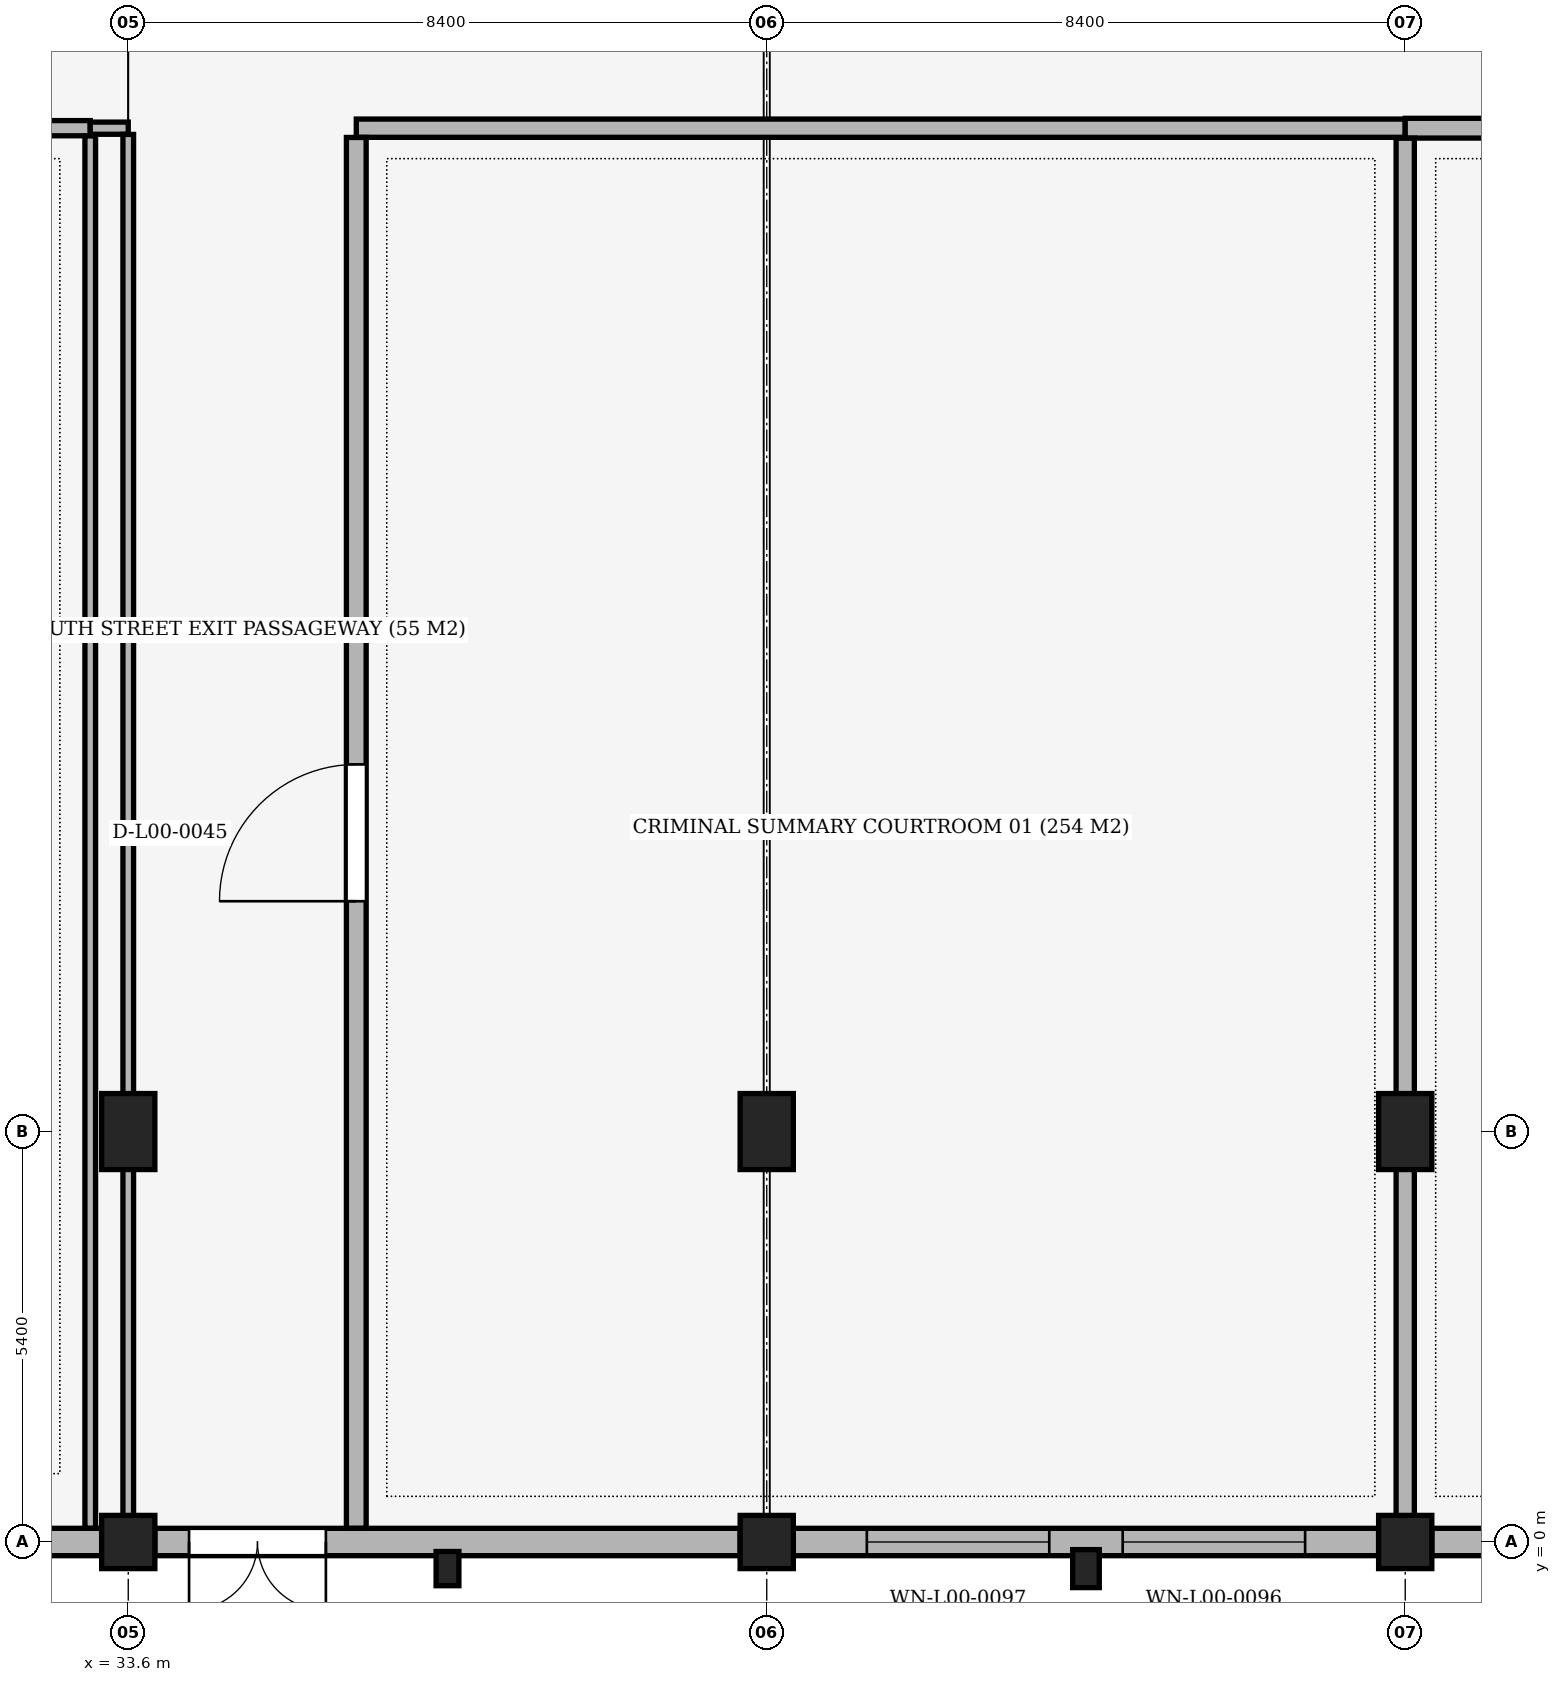
"""IFC4 building model, lengths in metres.
Left out: names, types, materials, properties, quantities, classifications, styles, units other than length and angle.
Written with IfcOpenShell. Run it as: python <this file> out.ifc"""

import sys

from ifc_helpers import new_model, si_unit, direction, frame, frame_2d, origin, origin_2d, place, context, subcontext, project, spatial, rectangle, extrude, element, fill, save


model = new_model("IFC4")
c1 = context("Model", 3, precision=1e-05, world=origin(), true_north=direction((0.0, 1.0)))
c2 = subcontext(c1, "Body", "Model", "MODEL_VIEW")
j1 = project(units=[si_unit("LENGTHUNIT", "METRE"), si_unit("PLANEANGLEUNIT", "RADIAN")], contexts=[c1])
p1 = place(None, origin())
s1 = spatial("IfcSite", under=j1, at=p1, CompositionType="ELEMENT")
p2 = place(p1, origin())
s2 = spatial("IfcBuilding", under=s1, at=p2, CompositionType="ELEMENT")
p3 = place(p2, origin())
s3 = spatial("IfcBuildingStorey", under=s2, at=p3, CompositionType="ELEMENT", Elevation=0.0)
p4 = place(p3, frame((33.6, 0.0, 0.0), z_axis=(0.0, 0.0, 1.0), x_axis=(1.0, 0.0, 0.0)))
e1 = element("IfcColumn", 1, at=p4, inside=s3, PredefinedType="COLUMN", context=c2, shape_type="SweptSolid", body=[
    extrude(rectangle(XDim=0.7, YDim=0.7, at=origin_2d()), origin(), (0.0, 0.0, 1.0), 5.1),
])
p5 = place(p3, frame((33.6, 5.4, 0.0), z_axis=(0.0, 0.0, 1.0), x_axis=(1.0, 0.0, 0.0)))
e2 = element("IfcColumn", 2, at=p5, inside=s3, PredefinedType="COLUMN", context=c2, shape_type="SweptSolid", body=[
    extrude(rectangle(XDim=0.7, YDim=1.0, at=origin_2d()), origin(), (0.0, 0.0, 1.0), 5.1),
])
p6 = place(p3, frame((42.0, 0.0, 0.0), z_axis=(0.0, 0.0, 1.0), x_axis=(1.0, 0.0, 0.0)))
e3 = element("IfcColumn", 3, at=p6, inside=s3, PredefinedType="COLUMN", context=c2, shape_type="SweptSolid", body=[
    extrude(rectangle(XDim=0.7, YDim=0.7, at=origin_2d()), origin(), (0.0, 0.0, 1.0), 5.1),
])
p7 = place(p3, frame((42.0, 5.4, 0.0), z_axis=(0.0, 0.0, 1.0), x_axis=(1.0, 0.0, 0.0)))
e4 = element("IfcColumn", 4, at=p7, inside=s3, PredefinedType="COLUMN", context=c2, shape_type="SweptSolid", body=[
    extrude(rectangle(XDim=0.7, YDim=1.0, at=origin_2d()), origin(), (0.0, 0.0, 1.0), 5.1),
])
p8 = place(p3, frame((50.4, 0.0, 0.0), z_axis=(0.0, 0.0, 1.0), x_axis=(1.0, 0.0, 0.0)))
e5 = element("IfcColumn", 5, at=p8, inside=s3, PredefinedType="COLUMN", context=c2, shape_type="SweptSolid", body=[
    extrude(rectangle(XDim=0.7, YDim=0.7, at=origin_2d()), origin(), (0.0, 0.0, 1.0), 5.1),
])
p9 = place(p3, frame((50.4, 5.4, 0.0), z_axis=(0.0, 0.0, 1.0), x_axis=(1.0, 0.0, 0.0)))
e6 = element("IfcColumn", 6, at=p9, inside=s3, PredefinedType="COLUMN", context=c2, shape_type="SweptSolid", body=[
    extrude(rectangle(XDim=0.7, YDim=1.0, at=origin_2d()), origin(), (0.0, 0.0, 1.0), 5.1),
])
p10 = place(p3, frame((37.8, -0.35, 0.0), z_axis=(0.0, 0.0, 1.0), x_axis=(1.0, 0.0, 0.0)))
e7 = element("IfcColumn", 7, at=p10, inside=s3, PredefinedType="PILASTER", context=c2, shape_type="SweptSolid", body=[
    extrude(rectangle(XDim=0.3, YDim=0.45, at=origin_2d()), origin(), (0.0, 0.0, 1.0), 5.1),
])
p11 = place(p3, frame((46.2, -0.35, 0.0), z_axis=(0.0, 0.0, 1.0), x_axis=(1.0, 0.0, 0.0)))
e8 = element("IfcColumn", 8, at=p11, inside=s3, PredefinedType="PILASTER", context=c2, shape_type="SweptSolid", body=[
    extrude(rectangle(XDim=0.35, YDim=0.5, at=origin_2d()), origin(), (0.0, 0.0, 1.0), 5.1),
])
p12 = place(p3, frame((58.45, 0.0, 0.0), z_axis=(0.0, 0.0, 1.0), x_axis=(-1.0, 0.0, 0.0)))
e9 = element("IfcWall", 9, at=p12, inside=s3, PredefinedType="SOLIDWALL", context=c2, shape_type="SweptSolid", body=[
    extrude(rectangle(XDim=7.7, YDim=0.36, at=frame_2d((3.85, 0.0))), origin(), (0.0, 0.0, 1.0), 4.07),
])
p13 = place(p12, frame((0.967, 0.0, 0.85)))
e10 = element("IfcOpeningElement", 10, at=p13, cuts=e9, PredefinedType="OPENING", context=c2, shape_type="SweptSolid", body=[
    extrude(rectangle(XDim=2.4, YDim=2.4, at=frame_2d((1.2, 1.2))), frame((0.0, 0.195, 0.0), z_axis=(0.0, -1.0, 0.0), x_axis=(1.0, 0.0, 0.0)), (0.0, 0.0, 1.0), 0.39),
])
p14 = place(p12, frame((4.333, 0.0, 0.85)))
e11 = element("IfcOpeningElement", 11, at=p14, cuts=e9, PredefinedType="OPENING", context=c2, shape_type="SweptSolid", body=[
    extrude(rectangle(XDim=2.4, YDim=2.4, at=frame_2d((1.2, 1.2))), frame((0.0, 0.195, 0.0), z_axis=(0.0, -1.0, 0.0), x_axis=(1.0, 0.0, 0.0)), (0.0, 0.0, 1.0), 0.39),
])
p15 = place(p3, frame((50.05, 0.0, 0.0), z_axis=(0.0, 0.0, 1.0), x_axis=(-1.0, 0.0, 0.0)))
e12 = element("IfcWall", 12, at=p15, inside=s3, PredefinedType="SOLIDWALL", context=c2, shape_type="SweptSolid", body=[
    extrude(rectangle(XDim=7.7, YDim=0.36, at=frame_2d((3.85, 0.0))), origin(), (0.0, 0.0, 1.0), 4.07),
])
p16 = place(p15, frame((0.967, 0.0, 0.85)))
e13 = element("IfcOpeningElement", 13, at=p16, cuts=e12, PredefinedType="OPENING", context=c2, shape_type="SweptSolid", body=[
    extrude(rectangle(XDim=2.4, YDim=2.4, at=frame_2d((1.2, 1.2))), frame((0.0, 0.195, 0.0), z_axis=(0.0, -1.0, 0.0), x_axis=(1.0, 0.0, 0.0)), (0.0, 0.0, 1.0), 0.39),
])
p17 = place(p15, frame((4.333, 0.0, 0.85)))
e14 = element("IfcOpeningElement", 14, at=p17, cuts=e12, PredefinedType="OPENING", context=c2, shape_type="SweptSolid", body=[
    extrude(rectangle(XDim=2.4, YDim=2.4, at=frame_2d((1.2, 1.2))), frame((0.0, 0.195, 0.0), z_axis=(0.0, -1.0, 0.0), x_axis=(1.0, 0.0, 0.0)), (0.0, 0.0, 1.0), 0.39),
])
p18 = place(p3, frame((41.65, 0.0, 0.0), z_axis=(0.0, 0.0, 1.0), x_axis=(-1.0, 0.0, 0.0)))
e15 = element("IfcWall", 15, at=p18, inside=s3, PredefinedType="SOLIDWALL", context=c2, shape_type="SweptSolid", body=[
    extrude(rectangle(XDim=7.7, YDim=0.36, at=frame_2d((3.85, 0.0))), origin(), (0.0, 0.0, 1.0), 4.07),
])
p19 = place(p18, frame((5.45, 0.0, 0.0)))
e16 = element("IfcOpeningElement", 16, at=p19, cuts=e15, PredefinedType="OPENING", context=c2, shape_type="SweptSolid", body=[
    extrude(rectangle(XDim=1.8, YDim=2.2, at=frame_2d((0.9, 1.1))), frame((0.0, 0.195, 0.0), z_axis=(0.0, -1.0, 0.0), x_axis=(1.0, 0.0, 0.0)), (0.0, 0.0, 1.0), 0.39),
])
p20 = place(p3, frame((33.25, 0.0, 0.0), z_axis=(0.0, 0.0, 1.0), x_axis=(-1.0, 0.0, 0.0)))
e17 = element("IfcWall", 17, at=p20, inside=s3, PredefinedType="SOLIDWALL", context=c2, shape_type="SweptSolid", body=[
    extrude(rectangle(XDim=7.7, YDim=0.36, at=frame_2d((3.85, 0.0))), origin(), (0.0, 0.0, 1.0), 4.07),
])
p21 = place(p20, frame((1.367, 0.0, 0.85)))
e18 = element("IfcOpeningElement", 18, at=p21, cuts=e17, PredefinedType="OPENING", context=c2, shape_type="SweptSolid", body=[
    extrude(rectangle(XDim=1.8, YDim=2.4, at=frame_2d((0.9, 1.2))), frame((0.0, 0.195, 0.0), z_axis=(0.0, -1.0, 0.0), x_axis=(1.0, 0.0, 0.0)), (0.0, 0.0, 1.0), 0.39),
])
p22 = place(p20, frame((4.533, 0.0, 0.85)))
e19 = element("IfcOpeningElement", 19, at=p22, cuts=e17, PredefinedType="OPENING", context=c2, shape_type="SweptSolid", body=[
    extrude(rectangle(XDim=1.8, YDim=2.4, at=frame_2d((0.9, 1.2))), frame((0.0, 0.195, 0.0), z_axis=(0.0, -1.0, 0.0), x_axis=(1.0, 0.0, 0.0)), (0.0, 0.0, 1.0), 0.39),
])
p23 = place(p3, frame((16.8, 18.6, 0.0), z_axis=(0.0, 0.0, 1.0), x_axis=(1.0, 0.0, 0.0)))
e20 = element("IfcWall", 20, at=p23, inside=s3, PredefinedType="PARTITIONING", context=c2, shape_type="SweptSolid", body=[
    extrude(rectangle(XDim=16.3, YDim=0.2, at=frame_2d((8.15, 0.0))), origin(), (0.0, 0.0, 1.0), 3.67),
])
p24 = place(p23, frame((7.35, 0.0, 0.0)))
e21 = element("IfcOpeningElement", 21, at=p24, cuts=e20, PredefinedType="OPENING", context=c2, shape_type="SweptSolid", body=[
    extrude(rectangle(XDim=1.6, YDim=2.3, at=frame_2d((0.8, 1.15))), frame((0.0, 0.115, 0.0), z_axis=(0.0, -1.0, 0.0), x_axis=(1.0, 0.0, 0.0)), (0.0, 0.0, 1.0), 0.23),
])
p25 = place(p3, frame((33.1, 18.6, 0.0), z_axis=(0.0, 0.0, 1.0), x_axis=(1.0, 0.0, 0.0)))
e22 = element("IfcWall", 22, at=p25, inside=s3, PredefinedType="PARTITIONING", context=c2, shape_type="SweptSolid", body=[
    extrude(rectangle(XDim=0.5, YDim=0.16, at=frame_2d((0.25, 0.0))), origin(), (0.0, 0.0, 1.0), 3.67),
])
p26 = place(p3, frame((36.6, 18.6, 0.0), z_axis=(0.0, 0.0, 1.0), x_axis=(1.0, 0.0, 0.0)))
e23 = element("IfcWall", 23, at=p26, inside=s3, PredefinedType="PARTITIONING", context=c2, shape_type="SweptSolid", body=[
    extrude(rectangle(XDim=13.8, YDim=0.24, at=frame_2d((6.9, 0.0))), origin(), (0.0, 0.0, 1.0), 3.67),
])
p27 = place(p3, frame((50.4, 18.6, 0.0), z_axis=(0.0, 0.0, 1.0), x_axis=(1.0, 0.0, 0.0)))
e24 = element("IfcWall", 24, at=p27, inside=s3, PredefinedType="PARTITIONING", context=c2, shape_type="SweptSolid", body=[
    extrude(rectangle(XDim=16.8, YDim=0.26, at=frame_2d((8.4, 0.0))), origin(), (0.0, 0.0, 1.0), 3.67),
])
p28 = place(p3, frame((33.1, 0.182, 0.0), z_axis=(0.0, 0.0, 1.0), x_axis=(0.0, 1.0, 0.0)))
e25 = element("IfcWall", 25, at=p28, inside=s3, PredefinedType="PARTITIONING", context=c2, shape_type="SweptSolid", body=[
    extrude(rectangle(XDim=18.316, YDim=0.14, at=frame_2d((9.158, 0.0))), origin(), (0.0, 0.0, 1.0), 4.07),
])
p29 = place(p3, frame((33.6, -0.028, 0.0), z_axis=(0.0, 0.0, 1.0), x_axis=(0.0, 1.0, 0.0)))
e26 = element("IfcWall", 26, at=p29, inside=s3, PredefinedType="PARTITIONING", context=c2, shape_type="SweptSolid", body=[
    extrude(rectangle(XDim=18.546, YDim=0.14, at=frame_2d((9.273, 0.0))), origin(), (0.0, 0.0, 1.0), 3.67),
])
p30 = place(p3, frame((36.6, 0.182, 0.0), z_axis=(0.0, 0.0, 1.0), x_axis=(0.0, 1.0, 0.0)))
e27 = element("IfcWall", 27, at=p30, inside=s3, PredefinedType="PARTITIONING", context=c2, shape_type="SweptSolid", body=[
    extrude(rectangle(XDim=18.296, YDim=0.26, at=frame_2d((9.148, 0.0))), origin(), (0.0, 0.0, 1.0), 4.07),
])
p31 = place(p30, frame((8.248, 0.0, 0.0)))
e28 = element("IfcOpeningElement", 28, at=p31, cuts=e27, PredefinedType="OPENING", context=c2, shape_type="SweptSolid", body=[
    extrude(rectangle(XDim=1.8, YDim=2.4, at=frame_2d((0.9, 1.2))), frame((0.0, 0.145, 0.0), z_axis=(0.0, -1.0, 0.0), x_axis=(1.0, 0.0, 0.0)), (0.0, 0.0, 1.0), 0.29),
])
p32 = place(p3, frame((50.4, -0.028, 0.0), z_axis=(0.0, 0.0, 1.0), x_axis=(0.0, 1.0, 0.0)))
e29 = element("IfcWall", 29, at=p32, inside=s3, PredefinedType="PARTITIONING", context=c2, shape_type="SweptSolid", body=[
    extrude(rectangle(XDim=18.496, YDim=0.24, at=frame_2d((9.248, 0.0))), origin(), (0.0, 0.0, 1.0), 3.67),
])
p33 = place(p16, origin())
e30 = element("IfcWindow", 30, at=p33, inside=s3, PartitioningType="SINGLE_PANEL", PredefinedType="WINDOW", context=c2, shape_type="SweptSolid", body=[
    extrude(rectangle(XDim=2.4, YDim=2.4, at=frame_2d((1.2, 1.2))), frame((0.0, 0.03, 0.0), z_axis=(0.0, -1.0, 0.0), x_axis=(1.0, 0.0, 0.0)), (0.0, 0.0, 1.0), 0.06),
])
fill(e13, e30)
p34 = place(p17, origin())
e31 = element("IfcWindow", 31, at=p34, inside=s3, PartitioningType="SINGLE_PANEL", PredefinedType="WINDOW", context=c2, shape_type="SweptSolid", body=[
    extrude(rectangle(XDim=2.4, YDim=2.4, at=frame_2d((1.2, 1.2))), frame((0.0, 0.03, 0.0), z_axis=(0.0, -1.0, 0.0), x_axis=(1.0, 0.0, 0.0)), (0.0, 0.0, 1.0), 0.06),
])
fill(e14, e31)
p35 = place(p19, origin())
e32 = element("IfcDoor", 32, at=p35, inside=s3, OperationType="DOUBLE_DOOR_SINGLE_SWING", PredefinedType="DOOR", context=c2, shape_type="SweptSolid", body=[
    extrude(rectangle(XDim=1.8, YDim=2.2, at=frame_2d((0.9, 1.1))), frame((0.0, 0.025, 0.0), z_axis=(0.0, -1.0, 0.0), x_axis=(1.0, 0.0, 0.0)), (0.0, 0.0, 1.0), 0.05),
])
fill(e16, e32)
p36 = place(p31, origin())
e33 = element("IfcDoor", 33, at=p36, inside=s3, OperationType="SINGLE_SWING_LEFT", PredefinedType="DOOR", context=c2, shape_type="SweptSolid", body=[
    extrude(rectangle(XDim=1.8, YDim=2.4, at=frame_2d((0.9, 1.2))), frame((0.0, 0.025, 0.0), z_axis=(0.0, -1.0, 0.0), x_axis=(1.0, 0.0, 0.0)), (0.0, 0.0, 1.0), 0.05),
])
fill(e28, e33)
save(model, sys.argv[1])
